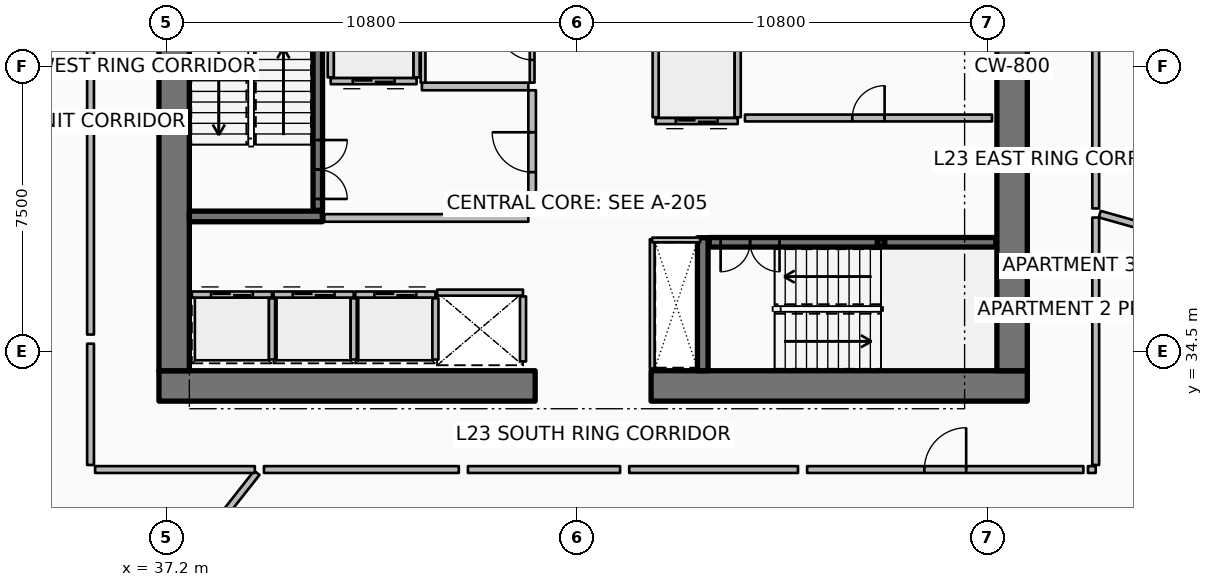
"""IFC4 building model, lengths in metres.
Left out: names, types, materials, properties, quantities, classifications, styles, units other than length and angle.
Written with IfcOpenShell. Run it as: python <this file> out.ifc"""

import sys

from ifc_helpers import new_model, si_unit, direction, frame, frame_2d, origin, origin_2d, place, context, subcontext, project, spatial, rectangle, hollow_rectangle, extrude, element, fill, save


model = new_model("IFC4")
c1 = context("Model", 3, precision=1e-05, world=origin(), true_north=direction((0.0, 1.0)))
c2 = subcontext(c1, "Body", "Model", "MODEL_VIEW")
j1 = project(units=[si_unit("LENGTHUNIT", "METRE"), si_unit("PLANEANGLEUNIT", "RADIAN")], contexts=[c1])
p1 = place(None, origin())
s1 = spatial("IfcSite", under=j1, at=p1, CompositionType="ELEMENT")
p2 = place(p1, origin())
s2 = spatial("IfcBuilding", under=s1, at=p2, CompositionType="ELEMENT")
p3 = place(p2, frame((0.0, 0.0, 93.9)))
s3 = spatial("IfcBuildingStorey", under=s2, at=p3, CompositionType="ELEMENT", Elevation=93.9)
p4 = place(p3, frame((37.0, 33.6, 0.0), z_axis=(0.0, 0.0, 1.0), x_axis=(1.0, 0.0, 0.0)))
e1 = element("IfcWall", 1, at=p4, inside=s3, PredefinedType="SHEAR", context=c2, shape_type="SweptSolid", body=[
    extrude(rectangle(XDim=9.9, YDim=0.8, at=frame_2d((4.95, 0.0))), origin(), (0.0, 0.0, 1.0), 3.75),
])
p5 = place(p3, frame((49.95, 33.6, 0.0), z_axis=(0.0, 0.0, 1.0), x_axis=(1.0, 0.0, 0.0)))
e2 = element("IfcWall", 2, at=p5, inside=s3, PredefinedType="SHEAR", context=c2, shape_type="SweptSolid", body=[
    extrude(rectangle(XDim=9.9, YDim=0.8, at=frame_2d((4.95, 0.0))), origin(), (0.0, 0.0, 1.0), 3.75),
])
for number, where, z_axis, x_axis in (
    (3, (37.4, 34.0, 0.0), (0.0, 0.0, 1.0), (0.0, 1.0, 0.0)),
    (4, (59.45, 34.0, 0.0), (0.0, 0.0, 1.0), (0.0, 1.0, 0.0)),
):
    element("IfcWall", number, at=place(p3, frame(where, z_axis=z_axis, x_axis=x_axis)), inside=s3, PredefinedType="SHEAR", context=c2, shape_type="SweptSolid", body=[
        extrude(rectangle(XDim=16.0, YDim=0.8, at=frame_2d((8.0, 0.0))), origin(), (0.0, 0.0, 1.0), 3.75),
    ])
for number, where, z_axis, x_axis in (
    (5, (37.8, 38.06, 0.0), (0.0, 0.0, 1.0), (1.0, 0.0, 0.0)),
    (6, (51.31, 34.0, 0.0), (0.0, 0.0, 1.0), (0.0, 1.0, 0.0)),
):
    element("IfcWall", number, at=place(p3, frame(where, z_axis=z_axis, x_axis=x_axis)), inside=s3, PredefinedType="SHEAR", context=c2, shape_type="SweptSolid", body=[
        extrude(rectangle(XDim=3.5, YDim=0.28, at=frame_2d((1.75, 0.0))), origin(), (0.0, 0.0, 1.0), 3.75),
    ])
p6 = place(p3, frame((56.0, 37.38, 0.0), z_axis=(0.0, 0.0, 1.0), x_axis=(1.0, 0.0, 0.0)))
e7 = element("IfcColumn", 7, at=p6, inside=s3, PredefinedType="COLUMN", context=c2, shape_type="SweptSolid", body=[
    extrude(hollow_rectangle(XDim=0.2, YDim=0.2, WallThickness=0.01, InnerFilletRadius=0.01, OuterFilletRadius=0.02, at=origin_2d()), origin(), (0.0, 0.0, 1.0), 1.67),
])
p7 = place(p3, frame((41.18, 38.22, 0.0), z_axis=(0.0, 0.0, 1.0), x_axis=(0.0, 1.0, 0.0)))
e8 = element("IfcWall", 8, at=p7, inside=s3, PredefinedType="SOLIDWALL", context=c2, shape_type="SweptSolid", body=[
    extrude(rectangle(XDim=7.56, YDim=0.25, at=frame_2d((3.78, 0.0))), origin(), (0.0, 0.0, 1.0), 3.5),
])
p8 = place(p7, frame((0.3, 0.0, 0.0)))
e9 = element("IfcOpeningElement", 9, at=p8, cuts=e8, PredefinedType="OPENING", context=c2, shape_type="SweptSolid", body=[
    extrude(rectangle(XDim=1.55, YDim=2.15, at=frame_2d((0.775, 1.075))), frame((0.0, 0.135, 0.0), z_axis=(0.0, -1.0, 0.0), x_axis=(1.0, 0.0, 0.0)), (0.0, 0.0, 1.0), 0.27),
])
p9 = place(p3, frame((51.48, 37.38, 0.0), z_axis=(0.0, 0.0, 1.0), x_axis=(1.0, 0.0, 0.0)))
e10 = element("IfcWall", 10, at=p9, inside=s3, PredefinedType="SOLIDWALL", context=c2, shape_type="SweptSolid", body=[
    extrude(rectangle(XDim=7.54, YDim=0.25, at=frame_2d((3.77, 0.0))), origin(), (0.0, 0.0, 1.0), 3.5),
])
p10 = place(p9, frame((0.3, 0.0, 0.0)))
e11 = element("IfcOpeningElement", 11, at=p10, cuts=e10, PredefinedType="OPENING", context=c2, shape_type="SweptSolid", body=[
    extrude(rectangle(XDim=1.55, YDim=2.15, at=frame_2d((0.775, 1.075))), frame((0.0, 0.135, 0.0), z_axis=(0.0, -1.0, 0.0), x_axis=(1.0, 0.0, 0.0)), (0.0, 0.0, 1.0), 0.27),
])
p11 = place(p3, frame((37.865, 36.005, 0.0), z_axis=(0.0, 0.0, 1.0), x_axis=(1.0, 0.0, 0.0)))
e12 = element("IfcWall", 12, at=p11, inside=s3, PredefinedType="PARTITIONING", context=c2, shape_type="SweptSolid", body=[
    extrude(rectangle(XDim=2.11, YDim=0.16, at=frame_2d((1.055, 0.0))), origin(), (0.0, 0.0, 1.0), 3.5),
])
p12 = place(p11, frame((0.505, 0.0, 0.0)))
e13 = element("IfcOpeningElement", 13, at=p12, cuts=e12, PredefinedType="OPENING", context=c2, shape_type="SweptSolid", body=[
    extrude(rectangle(XDim=1.1, YDim=2.1, at=frame_2d((0.55, 1.05))), frame((0.0, 0.09, 0.0), z_axis=(0.0, -1.0, 0.0), x_axis=(1.0, 0.0, 0.0)), (0.0, 0.0, 1.0), 0.18),
])
p13 = place(p3, frame((39.975, 34.295, 0.0), z_axis=(0.0, 0.0, 1.0), x_axis=(0.0, 1.0, 0.0)))
e14 = element("IfcWall", 14, at=p13, inside=s3, PredefinedType="PARTITIONING", context=c2, shape_type="SweptSolid", body=[
    extrude(rectangle(XDim=1.61, YDim=0.16, at=frame_2d((0.805, 0.0))), origin(), (0.0, 0.0, 1.0), 3.5),
])
p14 = place(p3, frame((40.015, 36.005, 0.0), z_axis=(0.0, 0.0, 1.0), x_axis=(1.0, 0.0, 0.0)))
e15 = element("IfcWall", 15, at=p14, inside=s3, PredefinedType="PARTITIONING", context=c2, shape_type="SweptSolid", body=[
    extrude(rectangle(XDim=2.11, YDim=0.16, at=frame_2d((1.055, 0.0))), origin(), (0.0, 0.0, 1.0), 3.5),
])
p15 = place(p14, frame((0.505, 0.0, 0.0)))
e16 = element("IfcOpeningElement", 16, at=p15, cuts=e15, PredefinedType="OPENING", context=c2, shape_type="SweptSolid", body=[
    extrude(rectangle(XDim=1.1, YDim=2.1, at=frame_2d((0.55, 1.05))), frame((0.0, 0.09, 0.0), z_axis=(0.0, -1.0, 0.0), x_axis=(1.0, 0.0, 0.0)), (0.0, 0.0, 1.0), 0.18),
])
p16 = place(p3, frame((42.125, 34.295, 0.0), z_axis=(0.0, 0.0, 1.0), x_axis=(0.0, 1.0, 0.0)))
e17 = element("IfcWall", 17, at=p16, inside=s3, PredefinedType="PARTITIONING", context=c2, shape_type="SweptSolid", body=[
    extrude(rectangle(XDim=1.61, YDim=0.16, at=frame_2d((0.805, 0.0))), origin(), (0.0, 0.0, 1.0), 3.5),
])
p17 = place(p3, frame((42.165, 36.005, 0.0), z_axis=(0.0, 0.0, 1.0), x_axis=(1.0, 0.0, 0.0)))
e18 = element("IfcWall", 18, at=p17, inside=s3, PredefinedType="PARTITIONING", context=c2, shape_type="SweptSolid", body=[
    extrude(rectangle(XDim=2.11, YDim=0.16, at=frame_2d((1.055, 0.0))), origin(), (0.0, 0.0, 1.0), 3.5),
])
p18 = place(p17, frame((0.505, 0.0, 0.0)))
e19 = element("IfcOpeningElement", 19, at=p18, cuts=e18, PredefinedType="OPENING", context=c2, shape_type="SweptSolid", body=[
    extrude(rectangle(XDim=1.1, YDim=2.1, at=frame_2d((0.55, 1.05))), frame((0.0, 0.09, 0.0), z_axis=(0.0, -1.0, 0.0), x_axis=(1.0, 0.0, 0.0)), (0.0, 0.0, 1.0), 0.18),
])
p19 = place(p3, frame((44.275, 34.295, 0.0), z_axis=(0.0, 0.0, 1.0), x_axis=(0.0, 1.0, 0.0)))
e20 = element("IfcWall", 20, at=p19, inside=s3, PredefinedType="PARTITIONING", context=c2, shape_type="SweptSolid", body=[
    extrude(rectangle(XDim=1.61, YDim=0.16, at=frame_2d((0.805, 0.0))), origin(), (0.0, 0.0, 1.0), 3.5),
])
p20 = place(p3, frame((44.32, 36.055, 0.0), z_axis=(0.0, 0.0, 1.0), x_axis=(1.0, 0.0, 0.0)))
e21 = element("IfcWall", 21, at=p20, inside=s3, PredefinedType="PARTITIONING", context=c2, shape_type="SweptSolid", body=[
    extrude(rectangle(XDim=2.26, YDim=0.16, at=frame_2d((1.13, 0.0))), origin(), (0.0, 0.0, 1.0), 3.5),
])
p21 = place(p3, frame((46.58, 34.245, 0.0), z_axis=(0.0, 0.0, 1.0), x_axis=(0.0, 1.0, 0.0)))
e22 = element("IfcWall", 22, at=p21, inside=s3, PredefinedType="PARTITIONING", context=c2, shape_type="SweptSolid", body=[
    extrude(rectangle(XDim=1.71, YDim=0.16, at=frame_2d((0.855, 0.0))), origin(), (0.0, 0.0, 1.0), 3.5),
])
p22 = place(p3, frame((43.78, 41.62, 0.0), z_axis=(0.0, 0.0, 1.0), x_axis=(-1.0, 0.0, 0.0)))
e23 = element("IfcWall", 23, at=p22, inside=s3, PredefinedType="PARTITIONING", context=c2, shape_type="SweptSolid", body=[
    extrude(rectangle(XDim=2.26, YDim=0.16, at=frame_2d((1.13, 0.0))), origin(), (0.0, 0.0, 1.0), 3.5),
])
p23 = place(p22, frame((0.58, 0.0, 0.0)))
e24 = element("IfcOpeningElement", 24, at=p23, cuts=e23, PredefinedType="OPENING", context=c2, shape_type="SweptSolid", body=[
    extrude(rectangle(XDim=1.1, YDim=2.1, at=frame_2d((0.55, 1.05))), frame((0.0, 0.09, 0.0), z_axis=(0.0, -1.0, 0.0), x_axis=(1.0, 0.0, 0.0)), (0.0, 0.0, 1.0), 0.18),
])
for number, where, z_axis, x_axis in (
    (25, (43.78, 41.72, 0.0), (0.0, 0.0, 1.0), (0.0, 1.0, 0.0)),
    (26, (41.52, 41.72, 0.0), (0.0, 0.0, 1.0), (0.0, 1.0, 0.0)),
):
    element("IfcWall", number, at=place(p3, frame(where, z_axis=z_axis, x_axis=x_axis)), inside=s3, PredefinedType="PARTITIONING", context=c2, shape_type="SweptSolid", body=[
        extrude(rectangle(XDim=2.26, YDim=0.16, at=frame_2d((1.13, 0.0))), origin(), (0.0, 0.0, 1.0), 3.5),
    ])
p24 = place(p3, frame((52.23, 40.57, 0.0), z_axis=(0.0, 0.0, 1.0), x_axis=(-1.0, 0.0, 0.0)))
e27 = element("IfcWall", 27, at=p24, inside=s3, PredefinedType="PARTITIONING", context=c2, shape_type="SweptSolid", body=[
    extrude(rectangle(XDim=2.16, YDim=0.16, at=frame_2d((1.08, 0.0))), origin(), (0.0, 0.0, 1.0), 3.5),
])
p25 = place(p24, frame((0.53, 0.0, 0.0)))
e28 = element("IfcOpeningElement", 28, at=p25, cuts=e27, PredefinedType="OPENING", context=c2, shape_type="SweptSolid", body=[
    extrude(rectangle(XDim=1.1, YDim=2.1, at=frame_2d((0.55, 1.05))), frame((0.0, 0.09, 0.0), z_axis=(0.0, -1.0, 0.0), x_axis=(1.0, 0.0, 0.0)), (0.0, 0.0, 1.0), 0.18),
])
for number, where, z_axis, x_axis in (
    (29, (52.23, 40.67, 0.0), (0.0, 0.0, 1.0), (0.0, 1.0, 0.0)),
    (30, (50.07, 40.67, 0.0), (0.0, 0.0, 1.0), (0.0, 1.0, 0.0)),
):
    element("IfcWall", number, at=place(p3, frame(where, z_axis=z_axis, x_axis=x_axis)), inside=s3, PredefinedType="PARTITIONING", context=c2, shape_type="SweptSolid", body=[
        extrude(rectangle(XDim=2.16, YDim=0.16, at=frame_2d((1.08, 0.0))), origin(), (0.0, 0.0, 1.0), 3.5),
    ])
p26 = place(p3, frame((52.42, 40.65, 0.0), z_axis=(0.0, 0.0, 1.0), x_axis=(1.0, 0.0, 0.0)))
e31 = element("IfcWall", 31, at=p26, inside=s3, PredefinedType="PARTITIONING", context=c2, shape_type="SweptSolid", body=[
    extrude(rectangle(XDim=6.5, YDim=0.18, at=frame_2d((3.25, 0.0))), origin(), (0.0, 0.0, 1.0), 3.5),
])
p27 = place(p26, frame((2.825, 0.0, 0.0)))
e32 = element("IfcOpeningElement", 32, at=p27, cuts=e31, PredefinedType="OPENING", context=c2, shape_type="SweptSolid", body=[
    extrude(rectangle(XDim=0.85, YDim=2.06, at=frame_2d((0.425, 1.03))), frame((0.0, 0.1, 0.0), z_axis=(0.0, -1.0, 0.0), x_axis=(1.0, 0.0, 0.0)), (0.0, 0.0, 1.0), 0.2),
])
p28 = place(p3, frame((41.35, 38.02, 0.0), z_axis=(0.0, 0.0, 1.0), x_axis=(1.0, 0.0, 0.0)))
e33 = element("IfcWall", 33, at=p28, inside=s3, PredefinedType="PARTITIONING", context=c2, shape_type="SweptSolid", body=[
    extrude(rectangle(XDim=5.37, YDim=0.2, at=frame_2d((2.685, 0.0))), origin(), (0.0, 0.0, 1.0), 3.5),
])
p29 = place(p3, frame((43.92, 41.48, 0.0), z_axis=(0.0, 0.0, 1.0), x_axis=(1.0, 0.0, 0.0)))
e34 = element("IfcWall", 34, at=p29, inside=s3, PredefinedType="PARTITIONING", context=c2, shape_type="SweptSolid", body=[
    extrude(rectangle(XDim=2.8, YDim=0.2, at=frame_2d((1.4, 0.0))), origin(), (0.0, 0.0, 1.0), 3.5),
])
p30 = place(p3, frame((46.82, 38.12, 0.0), z_axis=(0.0, 0.0, 1.0), x_axis=(0.0, 1.0, 0.0)))
e35 = element("IfcWall", 35, at=p30, inside=s3, PredefinedType="PARTITIONING", context=c2, shape_type="SweptSolid", body=[
    extrude(rectangle(XDim=3.26, YDim=0.2, at=frame_2d((1.63, 0.0))), origin(), (0.0, 0.0, 1.0), 3.5),
])
p31 = place(p30, frame((1.105, 0.0, 0.0)))
e36 = element("IfcOpeningElement", 36, at=p31, cuts=e35, PredefinedType="OPENING", context=c2, shape_type="SweptSolid", body=[
    extrude(rectangle(XDim=1.05, YDim=2.1, at=frame_2d((0.525, 1.05))), frame((0.0, 0.11, 0.0), z_axis=(0.0, -1.0, 0.0), x_axis=(1.0, 0.0, 0.0)), (0.0, 0.0, 1.0), 0.22),
])
p32 = place(p3, frame((49.98, 34.06, 0.0), z_axis=(0.0, 0.0, 1.0), x_axis=(0.0, 1.0, 0.0)))
e37 = element("IfcWall", 37, at=p32, inside=s3, PredefinedType="PARTITIONING", context=c2, shape_type="SweptSolid", body=[
    extrude(rectangle(XDim=3.4, YDim=0.125, at=frame_2d((1.7, 0.0))), origin(), (0.0, 0.0, 1.0), 2.94),
])
p33 = place(p3, frame((49.98, 37.44, 0.0), z_axis=(0.0, 0.0, 1.0), x_axis=(1.0, 0.0, 0.0)))
e38 = element("IfcWall", 38, at=p33, inside=s3, PredefinedType="PARTITIONING", context=c2, shape_type="SweptSolid", body=[
    extrude(rectangle(XDim=1.26, YDim=0.125, at=frame_2d((0.63, 0.0))), origin(), (0.0, 0.0, 1.0), 2.94),
])
p34 = place(p3, frame((43.95, 41.58, 0.0), z_axis=(0.0, 0.0, 1.0), x_axis=(0.0, 1.0, 0.0)))
e39 = element("IfcWall", 39, at=p34, inside=s3, PredefinedType="PARTITIONING", context=c2, shape_type="SweptSolid", body=[
    extrude(rectangle(XDim=4.32, YDim=0.125, at=frame_2d((2.16, 0.0))), origin(), (0.0, 0.0, 1.0), 2.94),
])
p35 = place(p3, frame((46.82, 41.58, 0.0), z_axis=(0.0, 0.0, 1.0), x_axis=(0.0, 1.0, 0.0)))
e40 = element("IfcWall", 40, at=p35, inside=s3, PredefinedType="PARTITIONING", context=c2, shape_type="SweptSolid", body=[
    extrude(rectangle(XDim=2.05, YDim=0.125, at=frame_2d((1.025, 0.0))), origin(), (0.0, 0.0, 1.0), 2.94),
])
p36 = place(p35, frame((0.6, 0.0, 0.0)))
e41 = element("IfcOpeningElement", 41, at=p36, cuts=e40, PredefinedType="OPENING", context=c2, shape_type="SweptSolid", body=[
    extrude(rectangle(XDim=0.85, YDim=2.06, at=frame_2d((0.425, 1.03))), frame((0.0, 0.073, 0.0), z_axis=(0.0, -1.0, 0.0), x_axis=(1.0, 0.0, 0.0)), (0.0, 0.0, 1.0), 0.145),
])
p37 = place(p3, frame((39.575, 31.314, 0.0), z_axis=(0.0, 0.0, 1.0), x_axis=(-0.619083417853, -0.785325233098, 0.0)))
e42 = element("IfcWall", 42, at=p37, inside=s3, PredefinedType="PARTITIONING", context=c2, shape_type="SweptSolid", body=[
    extrude(rectangle(XDim=15.063, YDim=0.18, at=frame_2d((7.532, 0.0))), origin(), (0.0, 0.0, 1.0), 2.94),
])
p38 = place(p3, frame((61.756, 38.12, 0.0), z_axis=(0.0, 0.0, 1.0), x_axis=(0.962455861176, -0.271438234756, 0.0)))
e43 = element("IfcWall", 43, at=p38, inside=s3, PredefinedType="PARTITIONING", context=c2, shape_type="SweptSolid", body=[
    extrude(rectangle(XDim=14.279, YDim=0.18, at=frame_2d((7.139, 0.0))), origin(), (0.0, 0.0, 1.0), 2.94),
])
p39 = place(p3, frame((35.2, 45.49, 0.0), z_axis=(0.0, 0.0, 1.0), x_axis=(0.0, -1.0, 0.0)))
e44 = element("IfcWall", 44, at=p39, inside=s3, PredefinedType="PARTITIONING", context=c2, shape_type="SweptSolid", body=[
    extrude(rectangle(XDim=4.885, YDim=0.18, at=frame_2d((2.442, 0.0))), origin(), (0.0, 0.0, 1.0), 2.94),
])
p40 = place(p3, frame((35.2, 40.365, 0.0), z_axis=(0.0, 0.0, 1.0), x_axis=(0.0, -1.0, 0.0)))
e45 = element("IfcWall", 45, at=p40, inside=s3, PredefinedType="PARTITIONING", context=c2, shape_type="SweptSolid", body=[
    extrude(rectangle(XDim=5.413, YDim=0.18, at=frame_2d((2.707, 0.0))), origin(), (0.0, 0.0, 1.0), 2.94),
])
p41 = place(p3, frame((35.2, 34.712, 0.0), z_axis=(0.0, 0.0, 1.0), x_axis=(0.0, -1.0, 0.0)))
e46 = element("IfcWall", 46, at=p41, inside=s3, PredefinedType="PARTITIONING", context=c2, shape_type="SweptSolid", body=[
    extrude(rectangle(XDim=3.192, YDim=0.18, at=frame_2d((1.596, 0.0))), origin(), (0.0, 0.0, 1.0), 2.94),
])
p42 = place(p3, frame((35.32, 31.4, 0.0), z_axis=(0.0, 0.0, 1.0), x_axis=(1.0, 0.0, 0.0)))
e47 = element("IfcWall", 47, at=p42, inside=s3, PredefinedType="PARTITIONING", context=c2, shape_type="SweptSolid", body=[
    extrude(rectangle(XDim=4.204, YDim=0.18, at=frame_2d((2.102, 0.0))), origin(), (0.0, 0.0, 1.0), 2.94),
])
p43 = place(p3, frame((54.056, 31.4, 0.0), z_axis=(0.0, 0.0, 1.0), x_axis=(1.0, 0.0, 0.0)))
e48 = element("IfcWall", 48, at=p43, inside=s3, PredefinedType="PARTITIONING", context=c2, shape_type="SweptSolid", body=[
    extrude(rectangle(XDim=7.27, YDim=0.18, at=frame_2d((3.635, 0.0))), origin(), (0.0, 0.0, 1.0), 2.94),
])
p44 = place(p43, frame((3.085, 0.0, 0.0)))
e49 = element("IfcOpeningElement", 49, at=p44, cuts=e48, PredefinedType="OPENING", context=c2, shape_type="SweptSolid", body=[
    extrude(rectangle(XDim=1.1, YDim=2.1, at=frame_2d((0.55, 1.05))), frame((0.0, 0.1, 0.0), z_axis=(0.0, -1.0, 0.0), x_axis=(1.0, 0.0, 0.0)), (0.0, 0.0, 1.0), 0.2),
])
p45 = place(p3, frame((39.764, 31.4, 0.0), z_axis=(0.0, 0.0, 1.0), x_axis=(1.0, 0.0, 0.0)))
e50 = element("IfcWall", 50, at=p45, inside=s3, PredefinedType="PARTITIONING", context=c2, shape_type="SweptSolid", body=[
    extrude(rectangle(XDim=5.127, YDim=0.18, at=frame_2d((2.563, 0.0))), origin(), (0.0, 0.0, 1.0), 2.94),
])
p46 = place(p3, frame((45.131, 31.4, 0.0), z_axis=(0.0, 0.0, 1.0), x_axis=(1.0, 0.0, 0.0)))
e51 = element("IfcWall", 51, at=p46, inside=s3, PredefinedType="PARTITIONING", context=c2, shape_type="SweptSolid", body=[
    extrude(rectangle(XDim=4.004, YDim=0.18, at=frame_2d((2.002, 0.0))), origin(), (0.0, 0.0, 1.0), 2.94),
])
p47 = place(p3, frame((49.375, 31.4, 0.0), z_axis=(0.0, 0.0, 1.0), x_axis=(1.0, 0.0, 0.0)))
e52 = element("IfcWall", 52, at=p47, inside=s3, PredefinedType="PARTITIONING", context=c2, shape_type="SweptSolid", body=[
    extrude(rectangle(XDim=4.442, YDim=0.18, at=frame_2d((2.221, 0.0))), origin(), (0.0, 0.0, 1.0), 2.94),
])
p48 = place(p3, frame((61.446, 31.4, 0.0), z_axis=(0.0, 0.0, 1.0), x_axis=(1.0, 0.0, 0.0)))
e53 = element("IfcWall", 53, at=p48, inside=s3, PredefinedType="PARTITIONING", context=c2, shape_type="SweptSolid", body=[
    extrude(rectangle(XDim=0.204, YDim=0.18, at=frame_2d((0.102, 0.0))), origin(), (0.0, 0.0, 1.0), 2.94),
])
p49 = place(p3, frame((61.65, 31.52, 0.0), z_axis=(0.0, 0.0, 1.0), x_axis=(0.0, 1.0, 0.0)))
e54 = element("IfcWall", 54, at=p49, inside=s3, PredefinedType="PARTITIONING", context=c2, shape_type="SweptSolid", body=[
    extrude(rectangle(XDim=6.51, YDim=0.18, at=frame_2d((3.255, 0.0))), origin(), (0.0, 0.0, 1.0), 2.94),
])
p50 = place(p3, frame((61.65, 38.27, 0.0), z_axis=(0.0, 0.0, 1.0), x_axis=(0.0, 1.0, 0.0)))
e55 = element("IfcWall", 55, at=p50, inside=s3, PredefinedType="PARTITIONING", context=c2, shape_type="SweptSolid", body=[
    extrude(rectangle(XDim=5.225, YDim=0.18, at=frame_2d((2.613, 0.0))), origin(), (0.0, 0.0, 1.0), 2.94),
])
p51 = place(p8, origin())
e56 = element("IfcDoor", 56, at=p51, inside=s3, OperationType="DOUBLE_DOOR_SINGLE_SWING", PredefinedType="DOOR", context=c2, shape_type="SweptSolid", body=[
    extrude(rectangle(XDim=1.55, YDim=2.15, at=frame_2d((0.775, 1.075))), frame((0.0, 0.025, 0.0), z_axis=(0.0, -1.0, 0.0), x_axis=(1.0, 0.0, 0.0)), (0.0, 0.0, 1.0), 0.05),
])
fill(e9, e56)
p52 = place(p10, origin())
e57 = element("IfcDoor", 57, at=p52, inside=s3, OperationType="DOUBLE_DOOR_SINGLE_SWING", PredefinedType="DOOR", context=c2, shape_type="SweptSolid", body=[
    extrude(rectangle(XDim=1.55, YDim=2.15, at=frame_2d((0.775, 1.075))), frame((0.0, 0.025, 0.0), z_axis=(0.0, -1.0, 0.0), x_axis=(1.0, 0.0, 0.0)), (0.0, 0.0, 1.0), 0.05),
])
fill(e11, e57)
p53 = place(p12, origin())
e58 = element("IfcDoor", 58, at=p53, inside=s3, OperationType="DOUBLE_DOOR_SLIDING", PredefinedType="DOOR", context=c2, shape_type="SweptSolid", body=[
    extrude(rectangle(XDim=1.1, YDim=2.1, at=frame_2d((0.55, 1.05))), frame((0.0, 0.025, 0.0), z_axis=(0.0, -1.0, 0.0), x_axis=(1.0, 0.0, 0.0)), (0.0, 0.0, 1.0), 0.05),
])
fill(e13, e58)
p54 = place(p15, origin())
e59 = element("IfcDoor", 59, at=p54, inside=s3, OperationType="DOUBLE_DOOR_SLIDING", PredefinedType="DOOR", context=c2, shape_type="SweptSolid", body=[
    extrude(rectangle(XDim=1.1, YDim=2.1, at=frame_2d((0.55, 1.05))), frame((0.0, 0.025, 0.0), z_axis=(0.0, -1.0, 0.0), x_axis=(1.0, 0.0, 0.0)), (0.0, 0.0, 1.0), 0.05),
])
fill(e16, e59)
p55 = place(p18, origin())
e60 = element("IfcDoor", 60, at=p55, inside=s3, OperationType="DOUBLE_DOOR_SLIDING", PredefinedType="DOOR", context=c2, shape_type="SweptSolid", body=[
    extrude(rectangle(XDim=1.1, YDim=2.1, at=frame_2d((0.55, 1.05))), frame((0.0, 0.025, 0.0), z_axis=(0.0, -1.0, 0.0), x_axis=(1.0, 0.0, 0.0)), (0.0, 0.0, 1.0), 0.05),
])
fill(e19, e60)
p56 = place(p23, origin())
e61 = element("IfcDoor", 61, at=p56, inside=s3, OperationType="DOUBLE_DOOR_SLIDING", PredefinedType="DOOR", context=c2, shape_type="SweptSolid", body=[
    extrude(rectangle(XDim=1.1, YDim=2.1, at=frame_2d((0.55, 1.05))), frame((0.0, 0.025, 0.0), z_axis=(0.0, -1.0, 0.0), x_axis=(1.0, 0.0, 0.0)), (0.0, 0.0, 1.0), 0.05),
])
fill(e24, e61)
p57 = place(p25, origin())
e62 = element("IfcDoor", 62, at=p57, inside=s3, OperationType="DOUBLE_DOOR_SLIDING", PredefinedType="DOOR", context=c2, shape_type="SweptSolid", body=[
    extrude(rectangle(XDim=1.1, YDim=2.1, at=frame_2d((0.55, 1.05))), frame((0.0, 0.025, 0.0), z_axis=(0.0, -1.0, 0.0), x_axis=(1.0, 0.0, 0.0)), (0.0, 0.0, 1.0), 0.05),
])
fill(e28, e62)
p58 = place(p27, origin())
e63 = element("IfcDoor", 63, at=p58, inside=s3, OperationType="SINGLE_SWING_RIGHT", PredefinedType="DOOR", context=c2, shape_type="SweptSolid", body=[
    extrude(rectangle(XDim=0.85, YDim=2.06, at=frame_2d((0.425, 1.03))), frame((0.0, 0.025, 0.0), z_axis=(0.0, -1.0, 0.0), x_axis=(1.0, 0.0, 0.0)), (0.0, 0.0, 1.0), 0.05),
])
fill(e32, e63)
p59 = place(p31, origin())
e64 = element("IfcDoor", 64, at=p59, inside=s3, OperationType="SINGLE_SWING_RIGHT", PredefinedType="DOOR", context=c2, shape_type="SweptSolid", body=[
    extrude(rectangle(XDim=1.05, YDim=2.1, at=frame_2d((0.525, 1.05))), frame((0.0, 0.025, 0.0), z_axis=(0.0, -1.0, 0.0), x_axis=(1.0, 0.0, 0.0)), (0.0, 0.0, 1.0), 0.05),
])
fill(e36, e64)
p60 = place(p36, origin())
e65 = element("IfcDoor", 65, at=p60, inside=s3, OperationType="SINGLE_SWING_RIGHT", PredefinedType="DOOR", context=c2, shape_type="SweptSolid", body=[
    extrude(rectangle(XDim=0.85, YDim=2.06, at=frame_2d((0.425, 1.03))), frame((0.0, 0.025, 0.0), z_axis=(0.0, -1.0, 0.0), x_axis=(1.0, 0.0, 0.0)), (0.0, 0.0, 1.0), 0.05),
])
fill(e41, e65)
p61 = place(p44, origin())
e66 = element("IfcDoor", 66, at=p61, inside=s3, OperationType="SINGLE_SWING_RIGHT", PredefinedType="DOOR", context=c2, shape_type="SweptSolid", body=[
    extrude(rectangle(XDim=1.1, YDim=2.1, at=frame_2d((0.55, 1.05))), frame((0.0, 0.025, 0.0), z_axis=(0.0, -1.0, 0.0), x_axis=(1.0, 0.0, 0.0)), (0.0, 0.0, 1.0), 0.05),
])
fill(e49, e66)
save(model, sys.argv[1])
